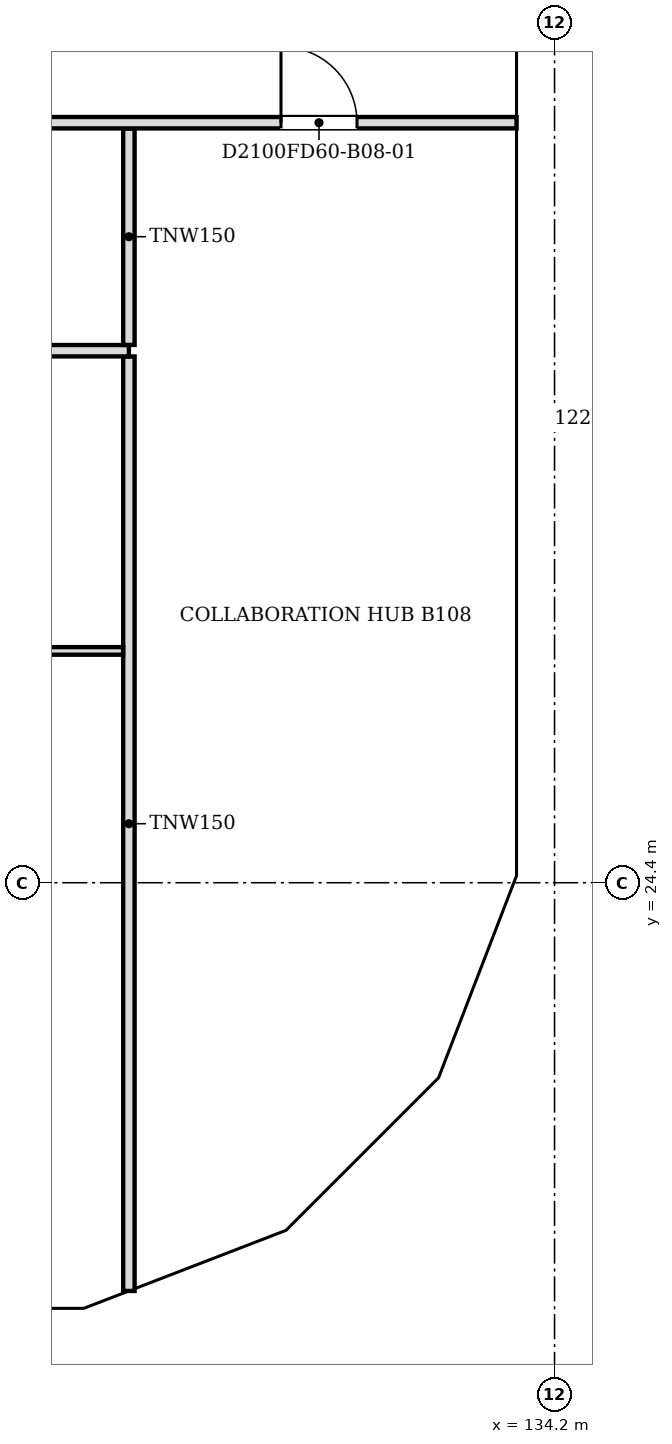
"""IFC4 building model, lengths in metres.
Left out: names, types, materials, properties, quantities, classifications, styles, units other than length and angle.
Written with IfcOpenShell. Run it as: python <this file> out.ifc"""

import sys

from ifc_helpers import new_model, si_unit, direction, frame, frame_2d, origin, place, context, subcontext, project, spatial, polyline, rectangle, outline, extrude, faceted_brep, source, transform, mapped, element, fill, save


model = new_model("IFC4")
c1 = context("Model", 3, precision=1e-05, world=origin(), true_north=direction((0.0, 1.0)))
c2 = subcontext(c1, "Body", "Model", "MODEL_VIEW")
j1 = project(units=[si_unit("LENGTHUNIT", "METRE"), si_unit("PLANEANGLEUNIT", "RADIAN")], contexts=[c1])
p1 = place(None, origin())
s1 = spatial("IfcSite", under=j1, at=p1, CompositionType="ELEMENT")
p2 = place(p1, origin())
s2 = spatial("IfcBuilding", under=s1, at=p2, CompositionType="ELEMENT")
p3 = place(p2, frame((0.0, 0.0, 80.0)))
s3 = spatial("IfcBuildingStorey", under=s2, at=p3, CompositionType="ELEMENT", Elevation=80.0)
m1 = source(origin(), c2, "Body", "Brep", [
    faceted_brep([(3.05, -0.25, 0.0), (6.053, -0.25, 3.8), (3.05, -0.25, 7.6), (0.0, -0.25, 3.8), (0.0, 0.25, 3.8), (3.05, 0.25, 7.6), (6.007, 0.25, 3.859), (6.007, 0.25, 3.741), (3.05, 0.25, 0.0), (6.053, 0.0, 3.8)], [[[0, 1, 2, 3]], [[4, 5, 6, 7, 8]], [[8, 7, 9, 1, 0]], [[6, 5, 2, 1, 9]], [[5, 4, 3, 2]], [[4, 8, 0, 3]], [[9, 7, 6]]]),
])
p4 = place(p3, frame((122.0, 18.55, -3.8), z_axis=(0.0, 0.0, 1.0), x_axis=(1.0, 0.0, 0.0)))
e1 = element("IfcWall", 1, at=p4, inside=s3, PredefinedType="SOLIDWALL", context=c2, shape_type="MappedRepresentation", body=[
    mapped(m1, transform((0.0, 0.0, 0.0), scale=1.0)),
])
m2 = source(origin(), c2, "Body", "SweptSolid", [
    extrude(outline(polyline([(3.049, 0.401), (5.735, 3.8), (3.049, 7.199), (0.321, 3.8), (3.049, 0.401)])), frame((0.0, 0.26, 0.0), z_axis=(0.0, -1.0, 0.0), x_axis=(1.0, 0.0, 0.0)), (0.0, 0.0, 1.0), 0.52),
])
p5 = place(p4, origin())
e2 = element("IfcOpeningElement", 2, at=p5, cuts=e1, PredefinedType="OPENING", context=c2, shape_type="MappedRepresentation", body=[
    mapped(m2, transform((0.0, 0.0, 0.0), scale=1.0)),
])
m3 = source(origin(), c2, "Body", "Brep", [
    faceted_brep([(2.95, -0.25, 0.0), (3.003, -0.25, 0.068), (3.003, -0.25, 7.532), (2.95, -0.25, 7.6), (0.0, -0.25, 3.8), (0.047, 0.25, 3.86), (2.898, 0.25, 7.532), (2.898, 0.25, 0.068), (0.047, 0.25, 3.74), (2.95, 0.0, 0.0), (2.95, 0.0, 7.6), (0.0, 0.0, 3.8)], [[[0, 1, 2, 3, 4]], [[5, 6, 7, 8]], [[1, 0, 9]], [[10, 3, 2]], [[6, 5, 11, 4, 3, 10]], [[8, 7, 9, 0, 4, 11]], [[8, 11, 5]], [[1, 9, 7, 6, 10, 2]]]),
])
p6 = place(p3, frame((128.053, 18.55, -3.8), z_axis=(0.0, 0.0, 1.0), x_axis=(0.933007896601, 0.359855894603, 0.0)))
e3 = element("IfcWall", 3, at=p6, inside=s3, PredefinedType="SOLIDWALL", context=c2, shape_type="MappedRepresentation", body=[
    mapped(m3, transform((0.0, 0.0, 0.0), scale=1.0)),
])
m4 = source(origin(), c2, "Body", "SweptSolid", [
    extrude(outline(polyline([(2.75, 6.935), (0.316, 3.8), (2.75, 0.665), (2.75, 6.935)])), frame((0.0, 0.26, 0.0), z_axis=(0.0, -1.0, 0.0), x_axis=(1.0, 0.0, 0.0)), (0.0, 0.0, 1.0), 0.52),
])
p7 = place(p6, origin())
e4 = element("IfcOpeningElement", 4, at=p7, cuts=e3, PredefinedType="OPENING", context=c2, shape_type="MappedRepresentation", body=[
    mapped(m4, transform((0.0, 0.0, 0.0), scale=1.0)),
])
m5 = source(origin(), c2, "Body", "Brep", [
    faceted_brep([(0.053, -0.25, 0.0), (2.997, -0.25, 3.8), (0.053, -0.25, 7.6), (0.0, -0.25, 7.532), (0.0, -0.25, 0.068), (0.106, 0.25, 7.532), (2.944, 0.25, 3.868), (2.944, 0.25, 3.732), (0.106, 0.25, 0.068), (2.997, 0.0, 3.8), (0.053, 0.0, 0.0), (0.053, 0.0, 7.6)], [[[0, 1, 2, 3, 4]], [[5, 6, 7, 8]], [[8, 7, 9, 1, 0, 10]], [[6, 5, 11, 2, 1, 9]], [[3, 2, 11]], [[10, 0, 4]], [[8, 10, 4, 3, 11, 5]], [[9, 7, 6]]]),
])
p8 = place(p3, frame((130.769, 19.574, -3.8), z_axis=(0.0, 0.0, 1.0), x_axis=(0.707106781187, 0.707106781187, 0.0)))
e5 = element("IfcWall", 5, at=p8, inside=s3, PredefinedType="SOLIDWALL", context=c2, shape_type="MappedRepresentation", body=[
    mapped(m5, transform((0.0, 0.0, 0.0), scale=1.0)),
])
m6 = source(origin(), c2, "Body", "SweptSolid", [
    extrude(outline(polyline([(0.253, 0.666), (2.681, 3.8), (0.253, 6.934), (0.253, 0.666)])), frame((0.0, 0.26, 0.0), z_axis=(0.0, -1.0, 0.0), x_axis=(1.0, 0.0, 0.0)), (0.0, 0.0, 1.0), 0.52),
])
p9 = place(p8, origin())
e6 = element("IfcOpeningElement", 6, at=p9, cuts=e5, PredefinedType="OPENING", context=c2, shape_type="MappedRepresentation", body=[
    mapped(m6, transform((0.0, 0.0, 0.0), scale=1.0)),
])
m7 = source(origin(), c2, "Body", "Brep", [
    faceted_brep([(2.95, -0.25, 0.0), (2.997, -0.25, 0.059), (2.997, -0.25, 7.541), (2.95, -0.25, 7.6), (0.0, -0.25, 3.8), (0.053, 0.25, 3.868), (2.904, 0.25, 7.54), (2.904, 0.25, 0.06), (0.053, 0.25, 3.732), (2.95, 0.0, 0.0), (2.95, 0.0, 7.6), (0.0, 0.0, 3.8)], [[[0, 1, 2, 3, 4]], [[5, 6, 7, 8]], [[1, 0, 9]], [[10, 3, 2]], [[6, 5, 11, 4, 3, 10]], [[8, 7, 9, 0, 4, 11]], [[8, 11, 5]], [[1, 9, 7, 6, 10, 2]]]),
])
p10 = place(p3, frame((132.888, 21.694, -3.8), z_axis=(0.0, 0.0, 1.0), x_axis=(0.359901446078, 0.932990326376, 0.0)))
e7 = element("IfcWall", 7, at=p10, inside=s3, PredefinedType="SOLIDWALL", context=c2, shape_type="MappedRepresentation", body=[
    mapped(m7, transform((0.0, 0.0, 0.0), scale=1.0)),
])
p11 = place(p10, origin())
e8 = element("IfcOpeningElement", 8, at=p11, cuts=e7, PredefinedType="OPENING", context=c2, shape_type="MappedRepresentation", body=[
    mapped(m4, transform((0.0, 0.0, 0.0), scale=1.0)),
])
m8 = source(origin(), c2, "Body", "Brep", [
    faceted_brep([(0.047, -0.25, 0.0), (3.05, -0.25, 3.8), (0.047, -0.25, 7.6), (0.0, -0.25, 7.54), (0.0, -0.25, 0.06), (0.093, 0.25, 7.541), (3.05, 0.25, 3.8), (0.093, 0.25, 0.059), (0.047, 0.0, 0.0), (0.047, 0.0, 7.6)], [[[0, 1, 2, 3, 4]], [[5, 6, 7]], [[7, 6, 1, 0, 8]], [[6, 5, 9, 2, 1]], [[3, 2, 9]], [[8, 0, 4]], [[7, 8, 4, 3, 9, 5]]]),
])
p12 = place(p3, frame((133.95, 24.4, -3.8), z_axis=(0.0, 0.0, 1.0), x_axis=(0.0, 1.0, 0.0)))
e9 = element("IfcWall", 9, at=p12, inside=s3, PredefinedType="SOLIDWALL", context=c2, shape_type="MappedRepresentation", body=[
    mapped(m8, transform((0.0, 0.0, 0.0), scale=1.0)),
])
m9 = source(origin(), c2, "Body", "SweptSolid", [
    extrude(outline(polyline([(0.247, 0.656), (2.731, 3.8), (0.247, 6.944), (0.247, 0.656)])), frame((0.0, 0.26, 0.0), z_axis=(0.0, -1.0, 0.0), x_axis=(1.0, 0.0, 0.0)), (0.0, 0.0, 1.0), 0.52),
])
p13 = place(p12, origin())
e10 = element("IfcOpeningElement", 10, at=p13, cuts=e9, PredefinedType="OPENING", context=c2, shape_type="MappedRepresentation", body=[
    mapped(m9, transform((0.0, 0.0, 0.0), scale=1.0)),
])
m10 = source(origin(), c2, "Body", "SweptSolid", [
    extrude(outline(polyline([(3.05, 0.0), (6.1, 3.8), (3.05, 7.6), (0.0, 3.8), (3.05, 0.0)])), frame((0.0, 0.25, 0.0), z_axis=(0.0, -1.0, 0.0), x_axis=(1.0, 0.0, 0.0)), (0.0, 0.0, 1.0), 0.5),
])
p14 = place(p3, frame((133.95, 27.45, -3.8), z_axis=(0.0, 0.0, 1.0), x_axis=(0.0, 1.0, 0.0)))
e11 = element("IfcWall", 11, at=p14, inside=s3, PredefinedType="SOLIDWALL", context=c2, shape_type="MappedRepresentation", body=[
    mapped(m10, transform((0.0, 0.0, 0.0), scale=1.0)),
])
m11 = source(origin(), c2, "Body", "SweptSolid", [
    extrude(outline(polyline([(3.05, 0.399), (5.78, 3.8), (3.05, 7.201), (0.321, 3.8), (3.05, 0.399)])), frame((0.0, 0.26, 0.0), z_axis=(0.0, -1.0, 0.0), x_axis=(1.0, 0.0, 0.0)), (0.0, 0.0, 1.0), 0.52),
])
p15 = place(p14, origin())
e12 = element("IfcOpeningElement", 12, at=p15, cuts=e11, PredefinedType="OPENING", context=c2, shape_type="MappedRepresentation", body=[
    mapped(m11, transform((0.0, 0.0, 0.0), scale=1.0)),
])
m12 = source(origin(), c2, "Body", "Brep", [
    faceted_brep([(3.05, -0.25, 0.0), (6.1, -0.25, 3.8), (6.1, -0.25, 3.8), (3.05, -0.25, 7.6), (0.0, -0.25, 3.8), (0.0, 0.25, 3.8), (3.05, 0.25, 7.6), (6.1, 0.25, 3.8), (6.1, 0.25, 3.8), (3.05, 0.25, 0.0)], [[[0, 1, 2, 3, 4]], [[5, 6, 7, 8, 9]], [[9, 8, 1, 0]], [[7, 6, 3, 2]], [[6, 5, 4, 3]], [[5, 9, 0, 4]], [[1, 8, 7, 2]]]),
])
p16 = place(p3, frame((133.95, 33.55, -3.8), z_axis=(0.0, 0.0, 1.0), x_axis=(0.0, 1.0, 0.0)))
e13 = element("IfcWall", 13, at=p16, inside=s3, PredefinedType="SOLIDWALL", context=c2, shape_type="MappedRepresentation", body=[
    mapped(m12, transform((0.0, 0.0, 0.0), scale=1.0)),
])
p17 = place(p16, origin())
e14 = element("IfcOpeningElement", 14, at=p17, cuts=e13, PredefinedType="OPENING", context=c2, shape_type="MappedRepresentation", body=[
    mapped(m11, transform((0.0, 0.0, 0.0), scale=1.0)),
])
p18 = place(p2, frame((0.0, 0.0, 83.8)))
s4 = spatial("IfcBuildingStorey", under=s2, at=p18, CompositionType="ELEMENT", Elevation=83.8)
m13 = source(origin(), c2, "Body", "Brep", [
    faceted_brep([(3.003, -0.25, 0.0), (3.05, -0.25, 0.06), (3.05, -0.25, 7.54), (3.003, -0.25, 7.6), (0.0, -0.25, 3.8), (0.0, 0.25, 3.8), (2.957, 0.25, 7.541), (2.957, 0.25, 0.059), (3.003, 0.0, 0.0), (3.003, 0.0, 7.6)], [[[0, 1, 2, 3, 4]], [[5, 6, 7]], [[1, 0, 8]], [[9, 3, 2]], [[6, 5, 4, 3, 9]], [[5, 7, 8, 0, 4]], [[1, 8, 7, 6, 9, 2]]]),
])
p19 = place(p18, frame((125.05, 18.55, -3.8), z_axis=(0.0, 0.0, 1.0), x_axis=(1.0, 0.0, 0.0)))
e15 = element("IfcWall", 15, at=p19, inside=s4, PredefinedType="SOLIDWALL", context=c2, shape_type="MappedRepresentation", body=[
    mapped(m13, transform((0.0, 0.0, 0.0), scale=1.0)),
])
m14 = source(origin(), c2, "Body", "SweptSolid", [
    extrude(outline(polyline([(2.803, 6.944), (0.319, 3.8), (2.803, 0.656), (2.803, 6.944)])), frame((0.0, 0.26, 0.0), z_axis=(0.0, -1.0, 0.0), x_axis=(1.0, 0.0, 0.0)), (0.0, 0.0, 1.0), 0.52),
])
p20 = place(p19, origin())
e16 = element("IfcOpeningElement", 16, at=p20, cuts=e15, PredefinedType="OPENING", context=c2, shape_type="MappedRepresentation", body=[
    mapped(m14, transform((0.0, 0.0, 0.0), scale=1.0)),
])
m15 = source(origin(), c2, "Body", "Brep", [
    faceted_brep([(0.047, -0.25, 0.0), (2.997, -0.25, 3.8), (0.047, -0.25, 7.6), (0.0, -0.25, 7.541), (0.0, -0.25, 0.059), (0.093, 0.25, 7.54), (2.944, 0.25, 3.868), (2.944, 0.25, 3.732), (0.093, 0.25, 0.06), (2.997, 0.0, 3.8), (0.047, 0.0, 0.0), (0.047, 0.0, 7.6)], [[[0, 1, 2, 3, 4]], [[5, 6, 7, 8]], [[8, 7, 9, 1, 0, 10]], [[6, 5, 11, 2, 1, 9]], [[3, 2, 11]], [[10, 0, 4]], [[8, 10, 4, 3, 11, 5]], [[9, 7, 6]]]),
])
p21 = place(p18, frame((128.01, 18.533, -3.8), z_axis=(0.0, 0.0, 1.0), x_axis=(0.932990326376, 0.359901446078, 0.0)))
e17 = element("IfcWall", 17, at=p21, inside=s4, PredefinedType="SOLIDWALL", context=c2, shape_type="MappedRepresentation", body=[
    mapped(m15, transform((0.0, 0.0, 0.0), scale=1.0)),
])
m16 = source(origin(), c2, "Body", "SweptSolid", [
    extrude(outline(polyline([(0.247, 0.665), (2.681, 3.8), (0.247, 6.935), (0.247, 0.665)])), frame((0.0, 0.26, 0.0), z_axis=(0.0, -1.0, 0.0), x_axis=(1.0, 0.0, 0.0)), (0.0, 0.0, 1.0), 0.52),
])
p22 = place(p21, origin())
e18 = element("IfcOpeningElement", 18, at=p22, cuts=e17, PredefinedType="OPENING", context=c2, shape_type="MappedRepresentation", body=[
    mapped(m16, transform((0.0, 0.0, 0.0), scale=1.0)),
])
m17 = source(origin(), c2, "Body", "Brep", [
    faceted_brep([(2.944, -0.25, 0.0), (2.997, -0.25, 0.068), (2.997, -0.25, 7.532), (2.944, -0.25, 7.6), (0.0, -0.25, 3.8), (0.053, 0.25, 3.868), (2.891, 0.25, 7.532), (2.891, 0.25, 0.068), (0.053, 0.25, 3.732), (2.944, 0.0, 0.0), (2.944, 0.0, 7.6), (0.0, 0.0, 3.8)], [[[0, 1, 2, 3, 4]], [[5, 6, 7, 8]], [[1, 0, 9]], [[10, 3, 2]], [[6, 5, 11, 4, 3, 10]], [[8, 7, 9, 0, 4, 11]], [[8, 11, 5]], [[1, 9, 7, 6, 10, 2]]]),
])
p23 = place(p18, frame((130.806, 19.612, -3.8), z_axis=(0.0, 0.0, 1.0), x_axis=(0.707106781187, 0.707106781187, 0.0)))
e19 = element("IfcWall", 19, at=p23, inside=s4, PredefinedType="SOLIDWALL", context=c2, shape_type="MappedRepresentation", body=[
    mapped(m17, transform((0.0, 0.0, 0.0), scale=1.0)),
])
m18 = source(origin(), c2, "Body", "SweptSolid", [
    extrude(outline(polyline([(2.744, 6.934), (0.316, 3.8), (2.744, 0.666), (2.744, 6.934)])), frame((0.0, 0.26, 0.0), z_axis=(0.0, -1.0, 0.0), x_axis=(1.0, 0.0, 0.0)), (0.0, 0.0, 1.0), 0.52),
])
p24 = place(p23, origin())
e20 = element("IfcOpeningElement", 20, at=p24, cuts=e19, PredefinedType="OPENING", context=c2, shape_type="MappedRepresentation", body=[
    mapped(m18, transform((0.0, 0.0, 0.0), scale=1.0)),
])
m19 = source(origin(), c2, "Body", "Brep", [
    faceted_brep([(0.053, -0.25, 0.0), (3.003, -0.25, 3.8), (0.053, -0.25, 7.6), (0.0, -0.25, 7.532), (0.0, -0.25, 0.068), (0.106, 0.25, 7.532), (2.957, 0.25, 3.86), (2.957, 0.25, 3.74), (0.106, 0.25, 0.068), (3.003, 0.0, 3.8), (0.053, 0.0, 0.0), (0.053, 0.0, 7.6)], [[[0, 1, 2, 3, 4]], [[5, 6, 7, 8]], [[8, 7, 9, 1, 0, 10]], [[6, 5, 11, 2, 1, 9]], [[3, 2, 11]], [[10, 0, 4]], [[8, 10, 4, 3, 11, 5]], [[9, 7, 6]]]),
])
p25 = place(p18, frame((132.869, 21.644, -3.8), z_axis=(0.0, 0.0, 1.0), x_axis=(0.359855894603, 0.933007896601, 0.0)))
e21 = element("IfcWall", 21, at=p25, inside=s4, PredefinedType="SOLIDWALL", context=c2, shape_type="MappedRepresentation", body=[
    mapped(m19, transform((0.0, 0.0, 0.0), scale=1.0)),
])
m20 = source(origin(), c2, "Body", "SweptSolid", [
    extrude(outline(polyline([(0.253, 0.665), (2.687, 3.8), (0.253, 6.935), (0.253, 0.665)])), frame((0.0, 0.26, 0.0), z_axis=(0.0, -1.0, 0.0), x_axis=(1.0, 0.0, 0.0)), (0.0, 0.0, 1.0), 0.52),
])
p26 = place(p25, origin())
e22 = element("IfcOpeningElement", 22, at=p26, cuts=e21, PredefinedType="OPENING", context=c2, shape_type="MappedRepresentation", body=[
    mapped(m20, transform((0.0, 0.0, 0.0), scale=1.0)),
])
m21 = source(origin(), c2, "Body", "Brep", [
    faceted_brep([(3.003, -0.25, 0.0), (6.053, -0.25, 3.8), (3.003, -0.25, 7.6), (0.0, -0.25, 3.8), (0.047, 0.25, 3.859), (3.003, 0.25, 7.6), (6.053, 0.25, 3.8), (3.003, 0.25, 0.0), (0.047, 0.25, 3.741), (0.0, 0.0, 3.8)], [[[0, 1, 2, 3]], [[4, 5, 6, 7, 8]], [[7, 6, 1, 0]], [[6, 5, 2, 1]], [[5, 4, 9, 3, 2]], [[8, 7, 0, 3, 9]], [[8, 9, 4]]]),
])
p27 = place(p18, frame((133.95, 24.447, -3.8), z_axis=(0.0, 0.0, 1.0), x_axis=(0.0, 1.0, 0.0)))
e23 = element("IfcWall", 23, at=p27, inside=s4, PredefinedType="SOLIDWALL", context=c2, shape_type="MappedRepresentation", body=[
    mapped(m21, transform((0.0, 0.0, 0.0), scale=1.0)),
])
m22 = source(origin(), c2, "Body", "SweptSolid", [
    extrude(outline(polyline([(3.005, 0.401), (5.733, 3.8), (3.005, 7.199), (0.319, 3.8), (3.005, 0.401)])), frame((0.0, 0.26, 0.0), z_axis=(0.0, -1.0, 0.0), x_axis=(1.0, 0.0, 0.0)), (0.0, 0.0, 1.0), 0.52),
])
p28 = place(p27, origin())
e24 = element("IfcOpeningElement", 24, at=p28, cuts=e23, PredefinedType="OPENING", context=c2, shape_type="MappedRepresentation", body=[
    mapped(m22, transform((0.0, 0.0, 0.0), scale=1.0)),
])
p29 = place(p18, frame((133.95, 30.5, -3.8), z_axis=(0.0, 0.0, 1.0), x_axis=(0.0, 1.0, 0.0)))
e25 = element("IfcWall", 25, at=p29, inside=s4, PredefinedType="SOLIDWALL", context=c2, shape_type="MappedRepresentation", body=[
    mapped(m10, transform((0.0, 0.0, 0.0), scale=1.0)),
])
p30 = place(p29, origin())
e26 = element("IfcOpeningElement", 26, at=p30, cuts=e25, PredefinedType="OPENING", context=c2, shape_type="MappedRepresentation", body=[
    mapped(m11, transform((0.0, 0.0, 0.0), scale=1.0)),
])
p31 = place(p3, frame((128.6, 19.029, 0.0), z_axis=(0.0, 0.0, 1.0), x_axis=(0.0, 1.0, 0.0)))
e27 = element("IfcWall", 27, at=p31, inside=s3, PredefinedType="PARTITIONING", context=c2, shape_type="SweptSolid", body=[
    extrude(rectangle(XDim=12.295, YDim=0.15, at=frame_2d((6.147, 0.0))), origin(), (0.0, 0.0, 1.0), 3.067),
])
p32 = place(p3, frame((128.524, 27.45, 0.0), z_axis=(0.0, 0.0, 1.0), x_axis=(-1.0, 0.0, 0.0)))
e28 = element("IfcWall", 28, at=p32, inside=s3, PredefinedType="PARTITIONING", context=c2, shape_type="SweptSolid", body=[
    extrude(rectangle(XDim=8.998, YDim=0.1, at=frame_2d((4.499, 0.0))), origin(), (0.0, 0.0, 1.0), 3.067),
])
m23 = source(origin(), c2, "Body", "SweptSolid", [
    extrude(rectangle(XDim=0.9, YDim=2.1, at=frame_2d((0.45, 1.05))), frame((0.0, 0.06, 0.0), z_axis=(0.0, -1.0, 0.0), x_axis=(1.0, 0.0, 0.0)), (0.0, 0.0, 1.0), 0.12),
])
p33 = place(p32, frame((4.098, 0.0, 0.0)))
e29 = element("IfcOpeningElement", 29, at=p33, cuts=e28, PredefinedType="OPENING", context=c2, shape_type="MappedRepresentation", body=[
    mapped(m23, transform((0.0, 0.0, 0.0), scale=1.0)),
])
p34 = place(p3, frame((128.6, 31.4, 0.0), z_axis=(0.0, 0.0, 1.0), x_axis=(-1.0, 0.0, 0.0)))
e30 = element("IfcWall", 30, at=p34, inside=s3, PredefinedType="PARTITIONING", context=c2, shape_type="SweptSolid", body=[
    extrude(rectangle(XDim=9.15, YDim=0.15, at=frame_2d((4.575, 0.0))), origin(), (0.0, 0.0, 1.0), 3.067),
])
m24 = source(origin(), c2, "Body", "SweptSolid", [
    extrude(rectangle(XDim=0.9, YDim=2.1, at=frame_2d((0.45, 1.05))), frame((0.0, 0.085, 0.0), z_axis=(0.0, -1.0, 0.0), x_axis=(1.0, 0.0, 0.0)), (0.0, 0.0, 1.0), 0.17),
])
p35 = place(p34, frame((4.15, 0.0, 0.0)))
e31 = element("IfcOpeningElement", 31, at=p35, cuts=e30, PredefinedType="OPENING", context=c2, shape_type="MappedRepresentation", body=[
    mapped(m24, transform((0.0, 0.0, 0.0), scale=1.0)),
])
p36 = place(p3, frame((128.6, 31.476, 0.0), z_axis=(0.0, 0.0, 1.0), x_axis=(0.0, 1.0, 0.0)))
e32 = element("IfcWall", 32, at=p36, inside=s3, PredefinedType="PARTITIONING", context=c2, shape_type="SweptSolid", body=[
    extrude(rectangle(XDim=2.848, YDim=0.15, at=frame_2d((1.424, 0.0))), origin(), (0.0, 0.0, 1.0), 3.067),
])
p37 = place(p3, frame((133.7, 34.4, 0.0), z_axis=(0.0, 0.0, 1.0), x_axis=(-1.0, 0.0, 0.0)))
e33 = element("IfcWall", 33, at=p37, inside=s3, PredefinedType="PARTITIONING", context=c2, shape_type="SweptSolid", body=[
    extrude(rectangle(XDim=47.8, YDim=0.15, at=frame_2d((23.9, 0.0))), origin(), (0.0, 0.0, 1.0), 3.067),
])
m25 = source(origin(), c2, "Body", "SweptSolid", [
    extrude(rectangle(XDim=1.0, YDim=2.1, at=frame_2d((0.5, 1.05))), frame((0.0, 0.085, 0.0), z_axis=(0.0, -1.0, 0.0), x_axis=(1.0, 0.0, 0.0)), (0.0, 0.0, 1.0), 0.17),
])
p38 = place(p37, frame((2.099, 0.0, 0.0)))
e34 = element("IfcOpeningElement", 34, at=p38, cuts=e33, PredefinedType="OPENING", context=c2, shape_type="MappedRepresentation", body=[
    mapped(m25, transform((0.0, 0.0, 0.0), scale=1.0)),
])
p39 = place(p37, frame((9.149, 0.0, 0.0)))
e35 = element("IfcOpeningElement", 35, at=p39, cuts=e33, PredefinedType="OPENING", context=c2, shape_type="MappedRepresentation", body=[
    mapped(m25, transform((0.0, 0.0, 0.0), scale=1.0)),
])
p40 = place(p37, frame((30.799, 0.0, 0.0)))
e36 = element("IfcOpeningElement", 36, at=p40, cuts=e33, PredefinedType="OPENING", context=c2, shape_type="MappedRepresentation", body=[
    mapped(m25, transform((0.0, 0.0, 0.0), scale=1.0)),
])
p41 = place(p37, frame((41.5, 0.0, 0.0)))
e37 = element("IfcOpeningElement", 37, at=p41, cuts=e33, PredefinedType="OPENING", context=c2, shape_type="MappedRepresentation", body=[
    mapped(m25, transform((0.0, 0.0, 0.0), scale=1.0)),
])
p42 = place(p37, frame((19.85, 0.0, 0.0)))
e38 = element("IfcOpeningElement", 38, at=p42, cuts=e33, PredefinedType="OPENING", context=c2, shape_type="MappedRepresentation", body=[
    mapped(m25, transform((0.0, 0.0, 0.0), scale=1.0)),
])
m26 = source(origin(), c2, "Body", "SweptSolid", [
    extrude(rectangle(XDim=1.0, YDim=2.1, at=frame_2d((0.5, 1.05))), frame((0.0, 0.025, 0.0), z_axis=(0.0, -1.0, 0.0), x_axis=(1.0, 0.0, 0.0)), (0.0, 0.0, 1.0), 0.05),
])
p43 = place(p38, origin())
e39 = element("IfcDoor", 39, at=p43, inside=s3, OperationType="SINGLE_SWING_RIGHT", PredefinedType="DOOR", context=c2, shape_type="MappedRepresentation", body=[
    mapped(m26, transform((0.0, 0.0, 0.0), scale=1.0)),
])
fill(e34, e39)
save(model, sys.argv[1])
